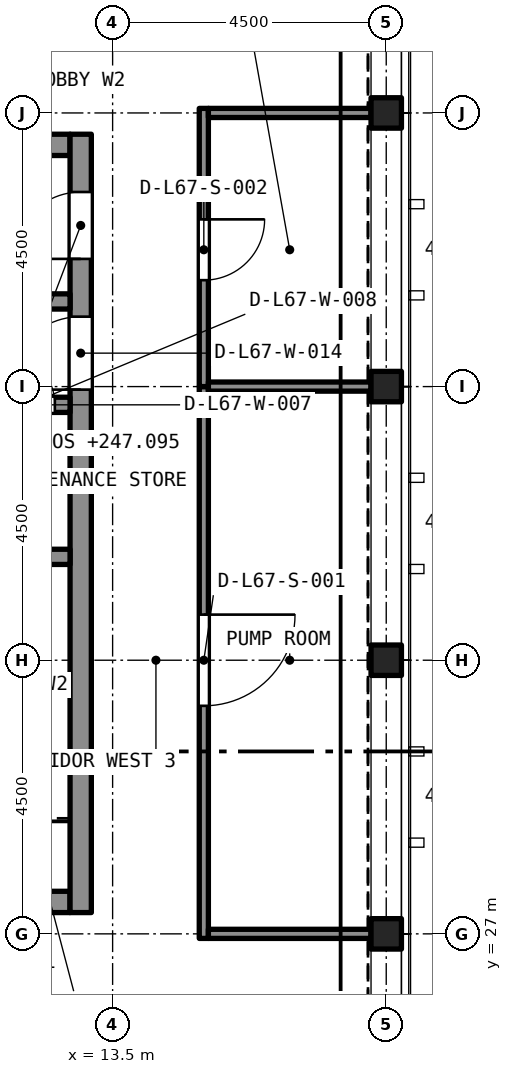
"""IFC4 building model, lengths in metres.
Left out: names, types, materials, properties, quantities, classifications, styles, units other than length and angle.
Written with IfcOpenShell. Run it as: python <this file> out.ifc"""

import sys

from ifc_helpers import new_model, si_unit, direction, frame, frame_2d, origin, origin_2d, place, context, subcontext, project, spatial, rectangle, hollow_rectangle, extrude, element, fill, save


model = new_model("IFC4")
c1 = context("Model", 3, precision=1e-05, world=origin(), true_north=direction((0.0, 1.0)))
c2 = subcontext(c1, "Body", "Model", "MODEL_VIEW")
j1 = project(units=[si_unit("LENGTHUNIT", "METRE"), si_unit("PLANEANGLEUNIT", "RADIAN")], contexts=[c1])
p1 = place(None, origin())
s1 = spatial("IfcSite", under=j1, at=p1, CompositionType="ELEMENT")
p2 = place(p1, origin())
s2 = spatial("IfcBuilding", under=s1, at=p2, CompositionType="ELEMENT")
p3 = place(p2, frame((0.0, 0.0, 247.095)))
s3 = spatial("IfcBuildingStorey", under=s2, at=p3, CompositionType="ELEMENT", Elevation=247.095)
p4 = place(p3, frame((5.2, 27.525, 0.0), z_axis=(0.0, 0.0, 1.0), x_axis=(1.0, 0.0, 0.0)))
e1 = element("IfcWall", 1, at=p4, inside=s3, PredefinedType="SOLIDWALL", context=c2, shape_type="SweptSolid", body=[
    extrude(rectangle(XDim=7.6, YDim=0.35, at=frame_2d((3.8, 0.0))), origin(), (0.0, 0.0, 1.0), 11.4),
])
p5 = place(p4, frame((0.725, 0.0, 0.0)))
e2 = element("IfcOpeningElement", 2, at=p5, cuts=e1, PredefinedType="OPENING", context=c2, shape_type="SweptSolid", body=[
    extrude(rectangle(XDim=1.1, YDim=2.1, at=frame_2d((0.55, 1.05))), frame((0.0, 0.185, 0.0), z_axis=(0.0, -1.0, 0.0), x_axis=(1.0, 0.0, 0.0)), (0.0, 0.0, 1.0), 0.37),
])
p6 = place(p4, frame((3.25, 0.0, 0.0)))
e3 = element("IfcOpeningElement", 3, at=p6, cuts=e1, PredefinedType="OPENING", context=c2, shape_type="SweptSolid", body=[
    extrude(rectangle(XDim=1.1, YDim=2.1, at=frame_2d((0.55, 1.05))), frame((0.0, 0.185, 0.0), z_axis=(0.0, -1.0, 0.0), x_axis=(1.0, 0.0, 0.0)), (0.0, 0.0, 1.0), 0.37),
])
p7 = place(p4, frame((5.775, 0.0, 0.0)))
e4 = element("IfcOpeningElement", 4, at=p7, cuts=e1, PredefinedType="OPENING", context=c2, shape_type="SweptSolid", body=[
    extrude(rectangle(XDim=1.1, YDim=2.1, at=frame_2d((0.55, 1.05))), frame((0.0, 0.185, 0.0), z_axis=(0.0, -1.0, 0.0), x_axis=(1.0, 0.0, 0.0)), (0.0, 0.0, 1.0), 0.37),
])
p8 = place(p3, frame((5.2, 39.975, 0.0), z_axis=(0.0, 0.0, 1.0), x_axis=(1.0, 0.0, 0.0)))
e5 = element("IfcWall", 5, at=p8, inside=s3, PredefinedType="SOLIDWALL", context=c2, shape_type="SweptSolid", body=[
    extrude(rectangle(XDim=7.6, YDim=0.35, at=frame_2d((3.8, 0.0))), origin(), (0.0, 0.0, 1.0), 11.4),
])
p9 = place(p3, frame((12.975, 27.35, 0.0), z_axis=(0.0, 0.0, 1.0), x_axis=(0.0, 1.0, 0.0)))
e6 = element("IfcWall", 6, at=p9, inside=s3, PredefinedType="SOLIDWALL", context=c2, shape_type="SweptSolid", body=[
    extrude(rectangle(XDim=12.8, YDim=0.35, at=frame_2d((6.4, 0.0))), origin(), (0.0, 0.0, 1.0), 11.4),
])
p10 = place(p9, frame((10.75, 0.0, 0.0)))
e7 = element("IfcOpeningElement", 7, at=p10, cuts=e6, PredefinedType="OPENING", context=c2, shape_type="SweptSolid", body=[
    extrude(rectangle(XDim=1.1, YDim=2.1, at=frame_2d((0.55, 1.05))), frame((0.0, 0.185, 0.0), z_axis=(0.0, -1.0, 0.0), x_axis=(1.0, 0.0, 0.0)), (0.0, 0.0, 1.0), 0.37),
])
p11 = place(p9, frame((8.6, 0.0, 0.0)))
e8 = element("IfcOpeningElement", 8, at=p11, cuts=e6, PredefinedType="OPENING", context=c2, shape_type="SweptSolid", body=[
    extrude(rectangle(XDim=1.2, YDim=2.1, at=frame_2d((0.6, 1.05))), frame((0.0, 0.185, 0.0), z_axis=(0.0, -1.0, 0.0), x_axis=(1.0, 0.0, 0.0)), (0.0, 0.0, 1.0), 0.37),
])
for number, where, z_axis, x_axis in (
    (9, (18.0, 27.0, 0.0), (0.0, 0.0, 1.0), (1.0, 0.0, 0.0)),
    (10, (18.0, 31.5, 0.0), (0.0, 0.0, 1.0), (1.0, 0.0, 0.0)),
    (11, (18.0, 36.0, 0.0), (0.0, 0.0, 1.0), (1.0, 0.0, 0.0)),
    (12, (18.0, 40.5, 0.0), (0.0, 0.0, 1.0), (1.0, 0.0, 0.0)),
):
    element("IfcColumn", number, at=place(p3, frame(where, z_axis=z_axis, x_axis=x_axis)), inside=s3, PredefinedType="COLUMN", context=c2, shape_type="SweptSolid", body=[
        extrude(hollow_rectangle(XDim=0.5, YDim=0.5, WallThickness=0.025, at=origin_2d()), origin(), (0.0, 0.0, 1.0), 11.37),
    ])
p12 = place(p3, frame((5.2, 33.2, 0.0), z_axis=(0.0, 0.0, 1.0), x_axis=(1.0, 0.0, 0.0)))
e13 = element("IfcWall", 13, at=p12, inside=s3, PredefinedType="SOLIDWALL", context=c2, shape_type="SweptSolid", body=[
    extrude(rectangle(XDim=7.6, YDim=0.25, at=frame_2d((3.8, 0.0))), origin(), (0.0, 0.0, 1.0), 9.8),
])
p13 = place(p12, frame((3.3, 0.0, 0.0)))
e14 = element("IfcOpeningElement", 14, at=p13, cuts=e13, PredefinedType="OPENING", context=c2, shape_type="SweptSolid", body=[
    extrude(rectangle(XDim=1.0, YDim=2.1, at=frame_2d((0.5, 1.05))), frame((0.0, 0.135, 0.0), z_axis=(0.0, -1.0, 0.0), x_axis=(1.0, 0.0, 0.0)), (0.0, 0.0, 1.0), 0.27),
])
p14 = place(p3, frame((5.2, 35.7, 0.0), z_axis=(0.0, 0.0, 1.0), x_axis=(1.0, 0.0, 0.0)))
e15 = element("IfcWall", 15, at=p14, inside=s3, PredefinedType="SOLIDWALL", context=c2, shape_type="SweptSolid", body=[
    extrude(rectangle(XDim=7.6, YDim=0.25, at=frame_2d((3.8, 0.0))), origin(), (0.0, 0.0, 1.0), 9.8),
])
p15 = place(p14, frame((0.725, 0.0, 0.0)))
e16 = element("IfcOpeningElement", 16, at=p15, cuts=e15, PredefinedType="OPENING", context=c2, shape_type="SweptSolid", body=[
    extrude(rectangle(XDim=1.1, YDim=2.4, at=frame_2d((0.55, 1.2))), frame((0.0, 0.135, 0.0), z_axis=(0.0, -1.0, 0.0), x_axis=(1.0, 0.0, 0.0)), (0.0, 0.0, 1.0), 0.27),
])
p16 = place(p14, frame((5.125, 0.0, 0.0)))
e17 = element("IfcOpeningElement", 17, at=p16, cuts=e15, PredefinedType="OPENING", context=c2, shape_type="SweptSolid", body=[
    extrude(rectangle(XDim=0.8, YDim=2.1, at=frame_2d((0.4, 1.05))), frame((0.0, 0.135, 0.0), z_axis=(0.0, -1.0, 0.0), x_axis=(1.0, 0.0, 0.0)), (0.0, 0.0, 1.0), 0.27),
])
p17 = place(p14, frame((6.45, 0.0, 0.0)))
e18 = element("IfcOpeningElement", 18, at=p17, cuts=e15, PredefinedType="OPENING", context=c2, shape_type="SweptSolid", body=[
    extrude(rectangle(XDim=0.9, YDim=2.1, at=frame_2d((0.45, 1.05))), frame((0.0, 0.135, 0.0), z_axis=(0.0, -1.0, 0.0), x_axis=(1.0, 0.0, 0.0)), (0.0, 0.0, 1.0), 0.27),
])
p18 = place(p3, frame((5.2, 37.4, 0.0), z_axis=(0.0, 0.0, 1.0), x_axis=(1.0, 0.0, 0.0)))
e19 = element("IfcWall", 19, at=p18, inside=s3, PredefinedType="SOLIDWALL", context=c2, shape_type="SweptSolid", body=[
    extrude(rectangle(XDim=7.6, YDim=0.25, at=frame_2d((3.8, 0.0))), origin(), (0.0, 0.0, 1.0), 9.8),
])
p19 = place(p18, frame((0.7, 0.0, 0.0)))
e20 = element("IfcOpeningElement", 20, at=p19, cuts=e19, PredefinedType="OPENING", context=c2, shape_type="SweptSolid", body=[
    extrude(rectangle(XDim=1.1, YDim=2.4, at=frame_2d((0.55, 1.2))), frame((0.0, 0.135, 0.0), z_axis=(0.0, -1.0, 0.0), x_axis=(1.0, 0.0, 0.0)), (0.0, 0.0, 1.0), 0.27),
])
p20 = place(p3, frame((15.0, 36.0, 0.0), z_axis=(0.0, 0.0, 1.0), x_axis=(0.0, -1.0, 0.0)))
e21 = element("IfcWall", 21, at=p20, inside=s3, PredefinedType="PARTITIONING", context=c2, shape_type="SweptSolid", body=[
    extrude(rectangle(XDim=9.075, YDim=0.15, at=frame_2d((4.538, 0.0))), origin(), (0.0, 0.0, 1.0), 9.8),
])
p21 = place(p20, frame((3.75, 0.0, 0.0)))
e22 = element("IfcOpeningElement", 22, at=p21, cuts=e21, PredefinedType="OPENING", context=c2, shape_type="SweptSolid", body=[
    extrude(rectangle(XDim=1.5, YDim=2.4, at=frame_2d((0.75, 1.2))), frame((0.0, 0.085, 0.0), z_axis=(0.0, -1.0, 0.0), x_axis=(1.0, 0.0, 0.0)), (0.0, 0.0, 1.0), 0.17),
])
p22 = place(p3, frame((15.0, 40.575, 0.0), z_axis=(0.0, 0.0, 1.0), x_axis=(0.0, -1.0, 0.0)))
e23 = element("IfcWall", 23, at=p22, inside=s3, PredefinedType="PARTITIONING", context=c2, shape_type="SweptSolid", body=[
    extrude(rectangle(XDim=4.575, YDim=0.15, at=frame_2d((2.288, 0.0))), origin(), (0.0, 0.0, 1.0), 9.8),
])
p23 = place(p22, frame((1.825, 0.0, 0.0)))
e24 = element("IfcOpeningElement", 24, at=p23, cuts=e23, PredefinedType="OPENING", context=c2, shape_type="SweptSolid", body=[
    extrude(rectangle(XDim=1.0, YDim=2.1, at=frame_2d((0.5, 1.05))), frame((0.0, 0.085, 0.0), z_axis=(0.0, -1.0, 0.0), x_axis=(1.0, 0.0, 0.0)), (0.0, 0.0, 1.0), 0.17),
])
for number, where, z_axis, x_axis in (
    (25, (15.075, 27.0, 0.0), (0.0, 0.0, 1.0), (1.0, 0.0, 0.0)),
    (26, (15.075, 40.5, 0.0), (0.0, 0.0, 1.0), (1.0, 0.0, 0.0)),
    (27, (15.075, 36.0, 0.0), (0.0, 0.0, 1.0), (1.0, 0.0, 0.0)),
):
    element("IfcWall", number, at=place(p3, frame(where, z_axis=z_axis, x_axis=x_axis)), inside=s3, PredefinedType="PARTITIONING", context=c2, shape_type="SweptSolid", body=[
        extrude(rectangle(XDim=2.675, YDim=0.15, at=frame_2d((1.337, 0.0))), origin(), (0.0, 0.0, 1.0), 9.8),
    ])
p24 = place(p17, origin())
e28 = element("IfcDoor", 28, at=p24, inside=s3, OperationType="SINGLE_SWING_LEFT", PredefinedType="DOOR", context=c2, shape_type="SweptSolid", body=[
    extrude(rectangle(XDim=0.9, YDim=2.1, at=frame_2d((0.45, 1.05))), frame((0.0, 0.025, 0.0), z_axis=(0.0, -1.0, 0.0), x_axis=(1.0, 0.0, 0.0)), (0.0, 0.0, 1.0), 0.05),
])
fill(e18, e28)
p25 = place(p10, origin())
e29 = element("IfcDoor", 29, at=p25, inside=s3, OperationType="SINGLE_SWING_LEFT", PredefinedType="DOOR", context=c2, shape_type="SweptSolid", body=[
    extrude(rectangle(XDim=1.1, YDim=2.1, at=frame_2d((0.55, 1.05))), frame((0.0, 0.025, 0.0), z_axis=(0.0, -1.0, 0.0), x_axis=(1.0, 0.0, 0.0)), (0.0, 0.0, 1.0), 0.05),
])
fill(e7, e29)
p26 = place(p11, origin())
e30 = element("IfcDoor", 30, at=p26, inside=s3, OperationType="SINGLE_SWING_LEFT", PredefinedType="DOOR", context=c2, shape_type="SweptSolid", body=[
    extrude(rectangle(XDim=1.2, YDim=2.1, at=frame_2d((0.6, 1.05))), frame((0.0, 0.025, 0.0), z_axis=(0.0, -1.0, 0.0), x_axis=(1.0, 0.0, 0.0)), (0.0, 0.0, 1.0), 0.05),
])
fill(e8, e30)
p27 = place(p21, origin())
e31 = element("IfcDoor", 31, at=p27, inside=s3, OperationType="DOUBLE_DOOR_SINGLE_SWING", PredefinedType="DOOR", context=c2, shape_type="SweptSolid", body=[
    extrude(rectangle(XDim=1.5, YDim=2.4, at=frame_2d((0.75, 1.2))), frame((0.0, 0.025, 0.0), z_axis=(0.0, -1.0, 0.0), x_axis=(1.0, 0.0, 0.0)), (0.0, 0.0, 1.0), 0.05),
])
fill(e22, e31)
p28 = place(p23, origin())
e32 = element("IfcDoor", 32, at=p28, inside=s3, OperationType="SINGLE_SWING_RIGHT", PredefinedType="DOOR", context=c2, shape_type="SweptSolid", body=[
    extrude(rectangle(XDim=1.0, YDim=2.1, at=frame_2d((0.5, 1.05))), frame((0.0, 0.025, 0.0), z_axis=(0.0, -1.0, 0.0), x_axis=(1.0, 0.0, 0.0)), (0.0, 0.0, 1.0), 0.05),
])
fill(e24, e32)
save(model, sys.argv[1])
